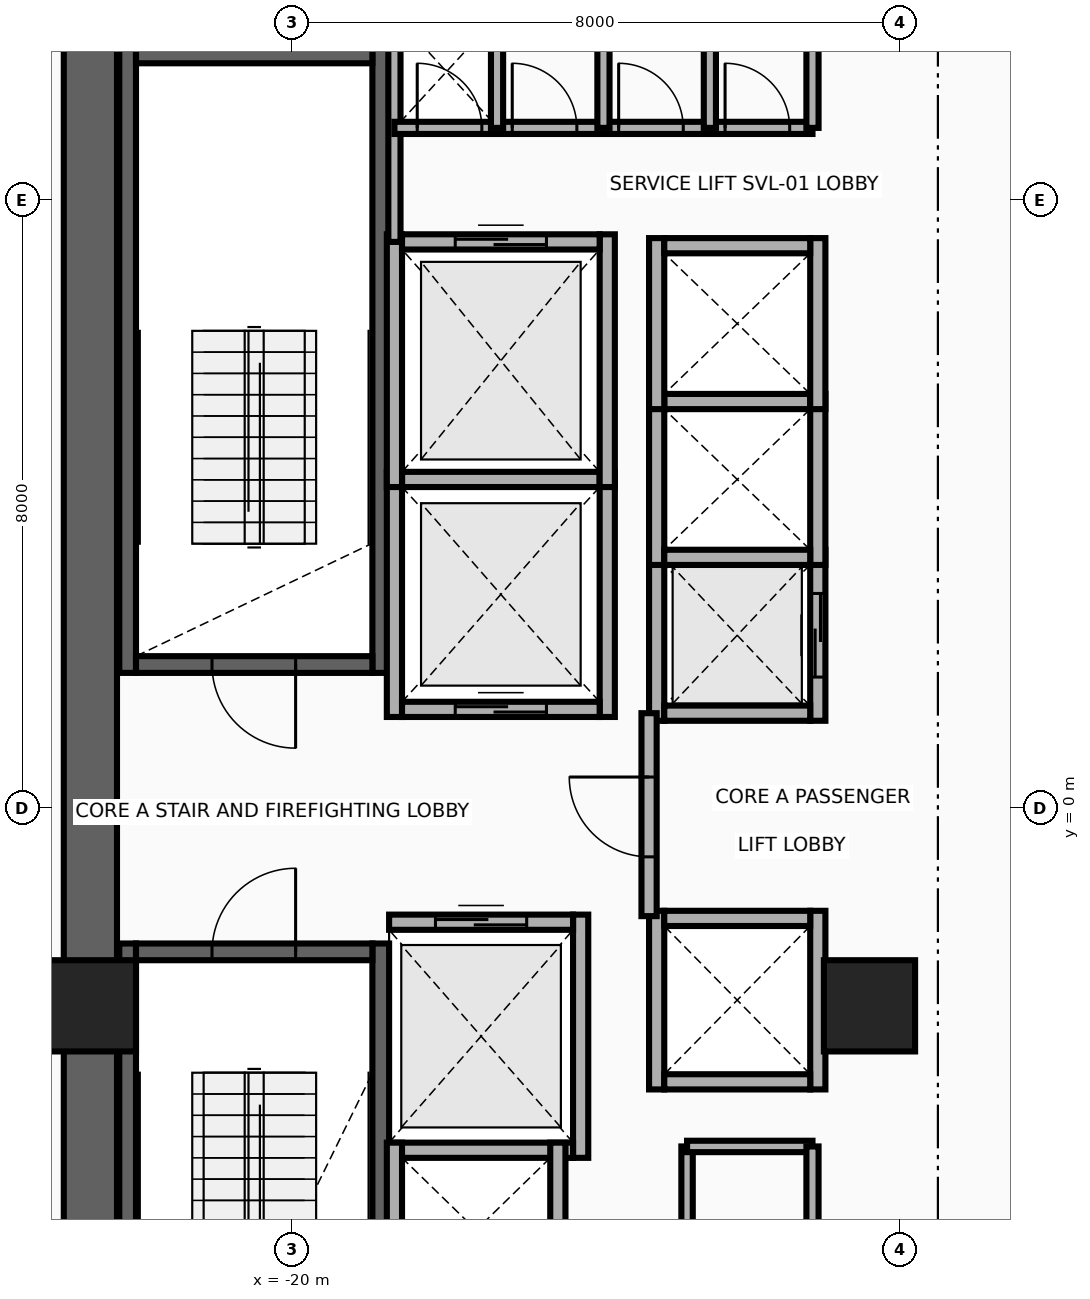
"""IFC4 building model, lengths in metres.
Left out: names, types, materials, properties, quantities, classifications, styles, units other than length and angle.
Written with IfcOpenShell. Run it as: python <this file> out.ifc"""

import sys

from ifc_helpers import new_model, si_unit, direction, frame, frame_2d, origin, origin_2d, place, context, subcontext, project, spatial, rectangle, extrude, source, transform, mapped, element, fill, save


model = new_model("IFC4")
c1 = context("Model", 3, precision=1e-05, world=origin(), true_north=direction((0.0, 1.0)))
c2 = subcontext(c1, "Body", "Model", "MODEL_VIEW")
j1 = project(units=[si_unit("LENGTHUNIT", "METRE"), si_unit("PLANEANGLEUNIT", "RADIAN")], contexts=[c1])
p1 = place(None, origin())
s1 = spatial("IfcSite", under=j1, at=p1, CompositionType="ELEMENT")
p2 = place(p1, origin())
s2 = spatial("IfcBuilding", under=s1, at=p2, CompositionType="ELEMENT")
p3 = place(p2, frame((0.0, 0.0, 109.4)))
s3 = spatial("IfcBuildingStorey", under=s2, at=p3, CompositionType="ELEMENT", Elevation=109.4)
for number, where, z_axis, x_axis in (
    (1, (-22.16, 1.78, 0.0), (0.0, 0.0, 1.0), (0.0, 1.0, 0.0)),
    (2, (-18.83, 1.78, 0.0), (0.0, 0.0, 1.0), (0.0, 1.0, 0.0)),
):
    element("IfcWall", number, at=place(p3, frame(where, z_axis=z_axis, x_axis=x_axis)), inside=s3, PredefinedType="SHEAR", context=c2, shape_type="SweptSolid", body=[
        extrude(rectangle(XDim=8.67, YDim=0.22, at=frame_2d((4.335, 0.0))), origin(), (0.0, 0.0, 1.0), 3.46),
    ])
p4 = place(p3, frame((-22.05, 1.89, 0.0), z_axis=(0.0, 0.0, 1.0), x_axis=(1.0, 0.0, 0.0)))
e3 = element("IfcWall", 3, at=p4, inside=s3, PredefinedType="SHEAR", context=c2, shape_type="SweptSolid", body=[
    extrude(rectangle(XDim=3.11, YDim=0.22, at=frame_2d((1.555, 0.0))), origin(), (0.0, 0.0, 1.0), 3.46),
])
p5 = place(p4, frame((1.0, 0.0, 0.0)))
e4 = element("IfcOpeningElement", 4, at=p5, cuts=e3, PredefinedType="OPENING", context=c2, shape_type="SweptSolid", body=[
    extrude(rectangle(XDim=1.1, YDim=2.15, at=frame_2d((0.55, 1.075))), frame((0.0, 0.125, 0.0), z_axis=(0.0, -1.0, 0.0), x_axis=(1.0, 0.0, 0.0)), (0.0, 0.0, 1.0), 0.25),
])
p6 = place(p3, frame((-22.05, 9.91, 0.0), z_axis=(0.0, 0.0, 1.0), x_axis=(1.0, 0.0, 0.0)))
e5 = element("IfcWall", 5, at=p6, inside=s3, PredefinedType="SHEAR", context=c2, shape_type="SweptSolid", body=[
    extrude(rectangle(XDim=3.11, YDim=0.22, at=frame_2d((1.555, 0.0))), origin(), (0.0, 0.0, 1.0), 3.46),
])
for number, where, z_axis, x_axis in (
    (6, (-22.16, -10.45, 0.0), (0.0, 0.0, 1.0), (0.0, 1.0, 0.0)),
    (7, (-18.83, -10.45, 0.0), (0.0, 0.0, 1.0), (0.0, 1.0, 0.0)),
):
    element("IfcWall", number, at=place(p3, frame(where, z_axis=z_axis, x_axis=x_axis)), inside=s3, PredefinedType="SHEAR", context=c2, shape_type="SweptSolid", body=[
        extrude(rectangle(XDim=8.67, YDim=0.22, at=frame_2d((4.335, 0.0))), origin(), (0.0, 0.0, 1.0), 3.46),
    ])
p7 = place(p3, frame((-22.05, -1.89, 0.0), z_axis=(0.0, 0.0, 1.0), x_axis=(1.0, 0.0, 0.0)))
e8 = element("IfcWall", 8, at=p7, inside=s3, PredefinedType="SHEAR", context=c2, shape_type="SweptSolid", body=[
    extrude(rectangle(XDim=3.11, YDim=0.22, at=frame_2d((1.555, 0.0))), origin(), (0.0, 0.0, 1.0), 3.46),
])
p8 = place(p7, frame((1.0, 0.0, 0.0)))
e9 = element("IfcOpeningElement", 9, at=p8, cuts=e8, PredefinedType="OPENING", context=c2, shape_type="SweptSolid", body=[
    extrude(rectangle(XDim=1.1, YDim=2.15, at=frame_2d((0.55, 1.075))), frame((0.0, 0.125, 0.0), z_axis=(0.0, -1.0, 0.0), x_axis=(1.0, 0.0, 0.0)), (0.0, 0.0, 1.0), 0.25),
])
p9 = place(p3, frame((-22.65, -11.15, 0.0), z_axis=(0.0, 0.0, 1.0), x_axis=(0.0, 1.0, 0.0)))
e10 = element("IfcWall", 10, at=p9, inside=s3, PredefinedType="SHEAR", context=c2, shape_type="SweptSolid", body=[
    extrude(rectangle(XDim=22.3, YDim=0.7, at=frame_2d((11.15, 0.0))), origin(), (0.0, 0.0, 1.0), 3.46),
])
m1 = source(origin(), c2, "Body", "SweptSolid", [
    extrude(rectangle(XDim=1.2, YDim=1.2, at=origin_2d()), origin(), (0.0, 0.0, 1.0), 3.7),
])
for number, where, z_axis, x_axis in (
    (11, (-22.65, -2.6, 0.0), (0.0, 0.0, 1.0), (1.0, 0.0, 0.0)),
    (12, (-12.4, -2.6, 0.0), (0.0, 0.0, 1.0), (1.0, 0.0, 0.0)),
):
    element("IfcColumn", number, at=place(p3, frame(where, z_axis=z_axis, x_axis=x_axis)), inside=s3, PredefinedType="COLUMN", context=c2, shape_type="MappedRepresentation", body=[
        mapped(m1, transform((0.0, 0.0, 0.0), x_axis=(1.0, 0.0, 0.0), y_axis=(0.0, 1.0, 0.0), z_axis=(0.0, 0.0, 1.0), scale=1.0)),
    ])
for number, where, z_axis, x_axis in (
    (13, (-18.65, 1.2, 0.0), (0.0, 0.0, 1.0), (0.0, 1.0, 0.0)),
    (14, (-15.85, 1.2, 0.0), (0.0, 0.0, 1.0), (0.0, 1.0, 0.0)),
):
    element("IfcWall", number, at=place(p3, frame(where, z_axis=z_axis, x_axis=x_axis)), inside=s3, PredefinedType="MOVABLE", context=c2, shape_type="SweptSolid", body=[
        extrude(rectangle(XDim=3.225, YDim=0.2, at=frame_2d((1.613, 0.0))), origin(), (0.0, 0.0, 1.0), 3.46),
    ])
p10 = place(p3, frame((-18.55, 1.3, 0.0), z_axis=(0.0, 0.0, 1.0), x_axis=(1.0, 0.0, 0.0)))
e15 = element("IfcWall", 15, at=p10, inside=s3, PredefinedType="MOVABLE", context=c2, shape_type="SweptSolid", body=[
    extrude(rectangle(XDim=2.6, YDim=0.2, at=frame_2d((1.3, 0.0))), origin(), (0.0, 0.0, 1.0), 3.46),
])
p11 = place(p10, frame((0.7, 0.0, 0.0)))
e16 = element("IfcOpeningElement", 16, at=p11, cuts=e15, PredefinedType="OPENING", context=c2, shape_type="SweptSolid", body=[
    extrude(rectangle(XDim=1.2, YDim=2.1, at=frame_2d((0.6, 1.05))), frame((0.0, 0.115, 0.0), z_axis=(0.0, -1.0, 0.0), x_axis=(1.0, 0.0, 0.0)), (0.0, 0.0, 1.0), 0.23),
])
p12 = place(p3, frame((-18.55, 4.325, 0.0), z_axis=(0.0, 0.0, 1.0), x_axis=(1.0, 0.0, 0.0)))
e17 = element("IfcWall", 17, at=p12, inside=s3, PredefinedType="MOVABLE", context=c2, shape_type="SweptSolid", body=[
    extrude(rectangle(XDim=2.6, YDim=0.2, at=frame_2d((1.3, 0.0))), origin(), (0.0, 0.0, 1.0), 3.46),
])
p13 = place(p3, frame((-16.2, -4.6, 0.0), z_axis=(0.0, 0.0, 1.0), x_axis=(0.0, 1.0, 0.0)))
e18 = element("IfcWall", 18, at=p13, inside=s3, PredefinedType="MOVABLE", context=c2, shape_type="SweptSolid", body=[
    extrude(rectangle(XDim=3.2, YDim=0.2, at=frame_2d((1.6, 0.0))), origin(), (0.0, 0.0, 1.0), 3.46),
])
p14 = place(p3, frame((-18.72, -4.5, 0.0), z_axis=(0.0, 0.0, 1.0), x_axis=(1.0, 0.0, 0.0)))
e19 = element("IfcWall", 19, at=p14, inside=s3, PredefinedType="MOVABLE", context=c2, shape_type="SweptSolid", body=[
    extrude(rectangle(XDim=2.42, YDim=0.2, at=frame_2d((1.21, 0.0))), origin(), (0.0, 0.0, 1.0), 3.46),
])
p15 = place(p3, frame((-18.72, -1.5, 0.0), z_axis=(0.0, 0.0, 1.0), x_axis=(1.0, 0.0, 0.0)))
e20 = element("IfcWall", 20, at=p15, inside=s3, PredefinedType="MOVABLE", context=c2, shape_type="SweptSolid", body=[
    extrude(rectangle(XDim=2.42, YDim=0.2, at=frame_2d((1.21, 0.0))), origin(), (0.0, 0.0, 1.0), 3.46),
])
p16 = place(p15, frame((0.61, 0.0, 0.0)))
e21 = element("IfcOpeningElement", 21, at=p16, cuts=e20, PredefinedType="OPENING", context=c2, shape_type="SweptSolid", body=[
    extrude(rectangle(XDim=1.2, YDim=2.1, at=frame_2d((0.6, 1.05))), frame((0.0, 0.115, 0.0), z_axis=(0.0, -1.0, 0.0), x_axis=(1.0, 0.0, 0.0)), (0.0, 0.0, 1.0), 0.23),
])
for number, where, z_axis, x_axis in (
    (22, (-18.65, 4.225, 0.0), (0.0, 0.0, 1.0), (0.0, 1.0, 0.0)),
    (23, (-15.85, 4.225, 0.0), (0.0, 0.0, 1.0), (0.0, 1.0, 0.0)),
):
    element("IfcWall", number, at=place(p3, frame(where, z_axis=z_axis, x_axis=x_axis)), inside=s3, PredefinedType="MOVABLE", context=c2, shape_type="SweptSolid", body=[
        extrude(rectangle(XDim=3.325, YDim=0.2, at=frame_2d((1.663, 0.0))), origin(), (0.0, 0.0, 1.0), 3.46),
    ])
p17 = place(p3, frame((-18.55, 7.45, 0.0), z_axis=(0.0, 0.0, 1.0), x_axis=(1.0, 0.0, 0.0)))
e24 = element("IfcWall", 24, at=p17, inside=s3, PredefinedType="MOVABLE", context=c2, shape_type="SweptSolid", body=[
    extrude(rectangle(XDim=2.6, YDim=0.2, at=frame_2d((1.3, 0.0))), origin(), (0.0, 0.0, 1.0), 3.46),
])
p18 = place(p17, frame((0.7, 0.0, 0.0)))
e25 = element("IfcOpeningElement", 25, at=p18, cuts=e24, PredefinedType="OPENING", context=c2, shape_type="SweptSolid", body=[
    extrude(rectangle(XDim=1.2, YDim=2.1, at=frame_2d((0.6, 1.05))), frame((0.0, 0.115, 0.0), z_axis=(0.0, -1.0, 0.0), x_axis=(1.0, 0.0, 0.0)), (0.0, 0.0, 1.0), 0.23),
])
p19 = place(p3, frame((-15.2, 1.15, 0.0), z_axis=(0.0, 0.0, 1.0), x_axis=(0.0, 1.0, 0.0)))
e26 = element("IfcWall", 26, at=p19, inside=s3, PredefinedType="MOVABLE", context=c2, shape_type="SweptSolid", body=[
    extrude(rectangle(XDim=2.25, YDim=0.2, at=frame_2d((1.125, 0.0))), origin(), (0.0, 0.0, 1.0), 3.46),
])
p20 = place(p3, frame((-13.08, 1.15, 0.0), z_axis=(0.0, 0.0, 1.0), x_axis=(0.0, 1.0, 0.0)))
e27 = element("IfcWall", 27, at=p20, inside=s3, PredefinedType="MOVABLE", context=c2, shape_type="SweptSolid", body=[
    extrude(rectangle(XDim=2.25, YDim=0.2, at=frame_2d((1.125, 0.0))), origin(), (0.0, 0.0, 1.0), 3.46),
])
p21 = place(p20, frame((0.575, 0.0, 0.0)))
e28 = element("IfcOpeningElement", 28, at=p21, cuts=e27, PredefinedType="OPENING", context=c2, shape_type="SweptSolid", body=[
    extrude(rectangle(XDim=1.1, YDim=2.1, at=frame_2d((0.55, 1.05))), frame((0.0, 0.115, 0.0), z_axis=(0.0, -1.0, 0.0), x_axis=(1.0, 0.0, 0.0)), (0.0, 0.0, 1.0), 0.23),
])
p22 = place(p3, frame((-15.1, 1.25, 0.0), z_axis=(0.0, 0.0, 1.0), x_axis=(1.0, 0.0, 0.0)))
e29 = element("IfcWall", 29, at=p22, inside=s3, PredefinedType="MOVABLE", context=c2, shape_type="SweptSolid", body=[
    extrude(rectangle(XDim=1.92, YDim=0.2, at=frame_2d((0.96, 0.0))), origin(), (0.0, 0.0, 1.0), 3.46),
])
for number, where, z_axis, x_axis in (
    (30, (-15.2, 3.2, 0.0), (0.0, 0.0, 1.0), (0.0, 1.0, 0.0)),
    (31, (-13.08, 3.2, 0.0), (0.0, 0.0, 1.0), (0.0, 1.0, 0.0)),
):
    element("IfcWall", number, at=place(p3, frame(where, z_axis=z_axis, x_axis=x_axis)), inside=s3, PredefinedType="MOVABLE", context=c2, shape_type="SweptSolid", body=[
        extrude(rectangle(XDim=2.25, YDim=0.2, at=frame_2d((1.125, 0.0))), origin(), (0.0, 0.0, 1.0), 3.46),
    ])
for number, where, z_axis, x_axis in (
    (32, (-15.1, 3.3, 0.0), (0.0, 0.0, 1.0), (1.0, 0.0, 0.0)),
    (33, (-15.1, 5.35, 0.0), (0.0, 0.0, 1.0), (1.0, 0.0, 0.0)),
):
    element("IfcWall", number, at=place(p3, frame(where, z_axis=z_axis, x_axis=x_axis)), inside=s3, PredefinedType="MOVABLE", context=c2, shape_type="SweptSolid", body=[
        extrude(rectangle(XDim=1.92, YDim=0.2, at=frame_2d((0.96, 0.0))), origin(), (0.0, 0.0, 1.0), 3.46),
    ])
for number, where, z_axis, x_axis in (
    (34, (-15.2, 5.25, 0.0), (0.0, 0.0, 1.0), (0.0, 1.0, 0.0)),
    (35, (-13.08, 5.25, 0.0), (0.0, 0.0, 1.0), (0.0, 1.0, 0.0)),
):
    element("IfcWall", number, at=place(p3, frame(where, z_axis=z_axis, x_axis=x_axis)), inside=s3, PredefinedType="MOVABLE", context=c2, shape_type="SweptSolid", body=[
        extrude(rectangle(XDim=2.25, YDim=0.2, at=frame_2d((1.125, 0.0))), origin(), (0.0, 0.0, 1.0), 3.46),
    ])
p23 = place(p3, frame((-15.1, 7.4, 0.0), z_axis=(0.0, 0.0, 1.0), x_axis=(1.0, 0.0, 0.0)))
e36 = element("IfcWall", 36, at=p23, inside=s3, PredefinedType="MOVABLE", context=c2, shape_type="SweptSolid", body=[
    extrude(rectangle(XDim=1.92, YDim=0.2, at=frame_2d((0.96, 0.0))), origin(), (0.0, 0.0, 1.0), 3.46),
])
for number, where, z_axis, x_axis in (
    (37, (-18.65, -6.7, 0.0), (0.0, 0.0, 1.0), (0.0, 1.0, 0.0)),
    (38, (-16.5, -6.7, 0.0), (0.0, 0.0, 1.0), (0.0, 1.0, 0.0)),
):
    element("IfcWall", number, at=place(p3, frame(where, z_axis=z_axis, x_axis=x_axis)), inside=s3, PredefinedType="MOVABLE", context=c2, shape_type="SweptSolid", body=[
        extrude(rectangle(XDim=2.3, YDim=0.2, at=frame_2d((1.15, 0.0))), origin(), (0.0, 0.0, 1.0), 3.46),
    ])
for number, where, z_axis, x_axis in (
    (39, (-15.2, -3.7, 0.0), (0.0, 0.0, 1.0), (0.0, 1.0, 0.0)),
    (40, (-13.08, -3.7, 0.0), (0.0, 0.0, 1.0), (0.0, 1.0, 0.0)),
):
    element("IfcWall", number, at=place(p3, frame(where, z_axis=z_axis, x_axis=x_axis)), inside=s3, PredefinedType="MOVABLE", context=c2, shape_type="SweptSolid", body=[
        extrude(rectangle(XDim=2.35, YDim=0.2, at=frame_2d((1.175, 0.0))), origin(), (0.0, 0.0, 1.0), 3.46),
    ])
for number, where, z_axis, x_axis in (
    (41, (-15.1, -3.6, 0.0), (0.0, 0.0, 1.0), (1.0, 0.0, 0.0)),
    (42, (-15.1, -1.45, 0.0), (0.0, 0.0, 1.0), (1.0, 0.0, 0.0)),
):
    element("IfcWall", number, at=place(p3, frame(where, z_axis=z_axis, x_axis=x_axis)), inside=s3, PredefinedType="MOVABLE", context=c2, shape_type="SweptSolid", body=[
        extrude(rectangle(XDim=1.92, YDim=0.2, at=frame_2d((0.96, 0.0))), origin(), (0.0, 0.0, 1.0), 3.46),
    ])
p24 = place(p3, frame((-15.3, -1.42, 0.0), z_axis=(0.0, 0.0, 1.0), x_axis=(0.0, 1.0, 0.0)))
e43 = element("IfcWall", 43, at=p24, inside=s3, PredefinedType="PARTITIONING", context=c2, shape_type="SweptSolid", body=[
    extrude(rectangle(XDim=2.67, YDim=0.2, at=frame_2d((1.335, 0.0))), origin(), (0.0, 0.0, 1.0), 3.46),
])
p25 = place(p24, frame((0.78, 0.0, 0.0)))
e44 = element("IfcOpeningElement", 44, at=p25, cuts=e43, PredefinedType="OPENING", context=c2, shape_type="SweptSolid", body=[
    extrude(rectangle(XDim=1.05, YDim=2.15, at=frame_2d((0.525, 1.075))), frame((0.0, 0.115, 0.0), z_axis=(0.0, -1.0, 0.0), x_axis=(1.0, 0.0, 0.0)), (0.0, 0.0, 1.0), 0.23),
])
p26 = place(p3, frame((-18.65, 7.45, 0.0), z_axis=(0.0, 0.0, 1.0), x_axis=(0.0, 1.0, 0.0)))
e45 = element("IfcWall", 45, at=p26, inside=s3, PredefinedType="PARTITIONING", context=c2, shape_type="SweptSolid", body=[
    extrude(rectangle(XDim=2.93, YDim=0.16, at=frame_2d((1.465, 0.0))), origin(), (0.0, 0.0, 1.0), 3.46),
])
p27 = place(p3, frame((-18.65, 8.95, 0.0), z_axis=(0.0, 0.0, 1.0), x_axis=(1.0, 0.0, 0.0)))
e46 = element("IfcWall", 46, at=p27, inside=s3, PredefinedType="PARTITIONING", context=c2, shape_type="SweptSolid", body=[
    extrude(rectangle(XDim=5.5, YDim=0.16, at=frame_2d((2.75, 0.0))), origin(), (0.0, 0.0, 1.0), 3.46),
])
p28 = place(p27, frame((0.3, 0.0, 0.0)))
e47 = element("IfcOpeningElement", 47, at=p28, cuts=e46, PredefinedType="OPENING", context=c2, shape_type="SweptSolid", body=[
    extrude(rectangle(XDim=0.85, YDim=2.05, at=frame_2d((0.425, 1.025))), frame((0.0, 0.095, 0.0), z_axis=(0.0, -1.0, 0.0), x_axis=(1.0, 0.0, 0.0)), (0.0, 0.0, 1.0), 0.19),
])
p29 = place(p27, frame((1.55, 0.0, 0.0)))
e48 = element("IfcOpeningElement", 48, at=p29, cuts=e46, PredefinedType="OPENING", context=c2, shape_type="SweptSolid", body=[
    extrude(rectangle(XDim=0.85, YDim=2.05, at=frame_2d((0.425, 1.025))), frame((0.0, 0.095, 0.0), z_axis=(0.0, -1.0, 0.0), x_axis=(1.0, 0.0, 0.0)), (0.0, 0.0, 1.0), 0.19),
])
p30 = place(p27, frame((2.95, 0.0, 0.0)))
e49 = element("IfcOpeningElement", 49, at=p30, cuts=e46, PredefinedType="OPENING", context=c2, shape_type="SweptSolid", body=[
    extrude(rectangle(XDim=0.85, YDim=2.05, at=frame_2d((0.425, 1.025))), frame((0.0, 0.095, 0.0), z_axis=(0.0, -1.0, 0.0), x_axis=(1.0, 0.0, 0.0)), (0.0, 0.0, 1.0), 0.19),
])
p31 = place(p27, frame((4.35, 0.0, 0.0)))
e50 = element("IfcOpeningElement", 50, at=p31, cuts=e46, PredefinedType="OPENING", context=c2, shape_type="SweptSolid", body=[
    extrude(rectangle(XDim=0.85, YDim=2.05, at=frame_2d((0.425, 1.025))), frame((0.0, 0.095, 0.0), z_axis=(0.0, -1.0, 0.0), x_axis=(1.0, 0.0, 0.0)), (0.0, 0.0, 1.0), 0.19),
])
for number, where, z_axis, x_axis in (
    (51, (-13.15, 8.95, 0.0), (0.0, 0.0, 1.0), (0.0, 1.0, 0.0)),
    (52, (-17.3, 8.95, 0.0), (0.0, 0.0, 1.0), (0.0, 1.0, 0.0)),
    (53, (-15.9, 8.95, 0.0), (0.0, 0.0, 1.0), (0.0, 1.0, 0.0)),
    (54, (-14.5, 8.95, 0.0), (0.0, 0.0, 1.0), (0.0, 1.0, 0.0)),
):
    element("IfcWall", number, at=place(p3, frame(where, z_axis=z_axis, x_axis=x_axis)), inside=s3, PredefinedType="PARTITIONING", context=c2, shape_type="SweptSolid", body=[
        extrude(rectangle(XDim=1.43, YDim=0.16, at=frame_2d((0.715, 0.0))), origin(), (0.0, 0.0, 1.0), 3.46),
    ])
p32 = place(p3, frame((-14.8, -6.58, 0.0), z_axis=(0.0, 0.0, 1.0), x_axis=(0.0, 1.0, 0.0)))
e55 = element("IfcWall", 55, at=p32, inside=s3, PredefinedType="PARTITIONING", context=c2, shape_type="SweptSolid", body=[
    extrude(rectangle(XDim=2.13, YDim=0.15, at=frame_2d((1.065, 0.0))), origin(), (0.0, 0.0, 1.0), 3.46),
])
p33 = place(p3, frame((-14.8, -4.45, 0.0), z_axis=(0.0, 0.0, 1.0), x_axis=(1.0, 0.0, 0.0)))
e56 = element("IfcWall", 56, at=p33, inside=s3, PredefinedType="PARTITIONING", context=c2, shape_type="SweptSolid", body=[
    extrude(rectangle(XDim=1.65, YDim=0.15, at=frame_2d((0.825, 0.0))), origin(), (0.0, 0.0, 1.0), 3.46),
])
p34 = place(p3, frame((-13.15, -6.58, 0.0), z_axis=(0.0, 0.0, 1.0), x_axis=(0.0, 1.0, 0.0)))
e57 = element("IfcWall", 57, at=p34, inside=s3, PredefinedType="PARTITIONING", context=c2, shape_type="SweptSolid", body=[
    extrude(rectangle(XDim=2.13, YDim=0.16, at=frame_2d((1.065, 0.0))), origin(), (0.0, 0.0, 1.0), 3.46),
])
p35 = place(p11, origin())
e58 = element("IfcDoor", 58, at=p35, inside=s3, OperationType="DOUBLE_DOOR_SLIDING", PredefinedType="DOOR", context=c2, shape_type="SweptSolid", body=[
    extrude(rectangle(XDim=1.2, YDim=2.1, at=frame_2d((0.6, 1.05))), frame((0.0, 0.025, 0.0), z_axis=(0.0, -1.0, 0.0), x_axis=(1.0, 0.0, 0.0)), (0.0, 0.0, 1.0), 0.05),
])
fill(e16, e58)
p36 = place(p16, origin())
e59 = element("IfcDoor", 59, at=p36, inside=s3, OperationType="DOUBLE_DOOR_SLIDING", PredefinedType="DOOR", context=c2, shape_type="SweptSolid", body=[
    extrude(rectangle(XDim=1.2, YDim=2.1, at=frame_2d((0.6, 1.05))), frame((0.0, 0.025, 0.0), z_axis=(0.0, -1.0, 0.0), x_axis=(1.0, 0.0, 0.0)), (0.0, 0.0, 1.0), 0.05),
])
fill(e21, e59)
p37 = place(p18, origin())
e60 = element("IfcDoor", 60, at=p37, inside=s3, OperationType="DOUBLE_DOOR_SLIDING", PredefinedType="DOOR", context=c2, shape_type="SweptSolid", body=[
    extrude(rectangle(XDim=1.2, YDim=2.1, at=frame_2d((0.6, 1.05))), frame((0.0, 0.025, 0.0), z_axis=(0.0, -1.0, 0.0), x_axis=(1.0, 0.0, 0.0)), (0.0, 0.0, 1.0), 0.05),
])
fill(e25, e60)
p38 = place(p21, origin())
e61 = element("IfcDoor", 61, at=p38, inside=s3, OperationType="DOUBLE_DOOR_SLIDING", PredefinedType="DOOR", context=c2, shape_type="SweptSolid", body=[
    extrude(rectangle(XDim=1.1, YDim=2.1, at=frame_2d((0.55, 1.05))), frame((0.0, 0.025, 0.0), z_axis=(0.0, -1.0, 0.0), x_axis=(1.0, 0.0, 0.0)), (0.0, 0.0, 1.0), 0.05),
])
fill(e28, e61)
p39 = place(p25, origin())
e62 = element("IfcDoor", 62, at=p39, inside=s3, OperationType="SINGLE_SWING_RIGHT", PredefinedType="DOOR", context=c2, shape_type="SweptSolid", body=[
    extrude(rectangle(XDim=1.05, YDim=2.15, at=frame_2d((0.525, 1.075))), frame((0.0, 0.025, 0.0), z_axis=(0.0, -1.0, 0.0), x_axis=(1.0, 0.0, 0.0)), (0.0, 0.0, 1.0), 0.05),
])
fill(e44, e62)
p40 = place(p5, frame((1.1, 0.0, 0.0), z_axis=(0.0, 0.0, 1.0), x_axis=(-1.0, 0.0, 0.0)))
e63 = element("IfcDoor", 63, at=p40, inside=s3, OperationType="SINGLE_SWING_LEFT", PredefinedType="DOOR", context=c2, shape_type="SweptSolid", body=[
    extrude(rectangle(XDim=1.1, YDim=2.15, at=frame_2d((0.55, 1.075))), frame((0.0, 0.025, 0.0), z_axis=(0.0, -1.0, 0.0), x_axis=(1.0, 0.0, 0.0)), (0.0, 0.0, 1.0), 0.05),
])
fill(e4, e63)
p41 = place(p8, origin())
e64 = element("IfcDoor", 64, at=p41, inside=s3, OperationType="SINGLE_SWING_RIGHT", PredefinedType="DOOR", context=c2, shape_type="SweptSolid", body=[
    extrude(rectangle(XDim=1.1, YDim=2.15, at=frame_2d((0.55, 1.075))), frame((0.0, 0.025, 0.0), z_axis=(0.0, -1.0, 0.0), x_axis=(1.0, 0.0, 0.0)), (0.0, 0.0, 1.0), 0.05),
])
fill(e9, e64)
p42 = place(p28, origin())
e65 = element("IfcDoor", 65, at=p42, inside=s3, OperationType="SINGLE_SWING_LEFT", PredefinedType="DOOR", context=c2, shape_type="SweptSolid", body=[
    extrude(rectangle(XDim=0.85, YDim=2.05, at=frame_2d((0.425, 1.025))), frame((0.0, 0.025, 0.0), z_axis=(0.0, -1.0, 0.0), x_axis=(1.0, 0.0, 0.0)), (0.0, 0.0, 1.0), 0.05),
])
fill(e47, e65)
p43 = place(p29, origin())
e66 = element("IfcDoor", 66, at=p43, inside=s3, OperationType="SINGLE_SWING_RIGHT", PredefinedType="DOOR", context=c2, shape_type="SweptSolid", body=[
    extrude(rectangle(XDim=0.85, YDim=2.05, at=frame_2d((0.425, 1.025))), frame((0.0, 0.025, 0.0), z_axis=(0.0, -1.0, 0.0), x_axis=(1.0, 0.0, 0.0)), (0.0, 0.0, 1.0), 0.05),
])
fill(e48, e66)
p44 = place(p30, origin())
e67 = element("IfcDoor", 67, at=p44, inside=s3, OperationType="SINGLE_SWING_LEFT", PredefinedType="DOOR", context=c2, shape_type="SweptSolid", body=[
    extrude(rectangle(XDim=0.85, YDim=2.05, at=frame_2d((0.425, 1.025))), frame((0.0, 0.025, 0.0), z_axis=(0.0, -1.0, 0.0), x_axis=(1.0, 0.0, 0.0)), (0.0, 0.0, 1.0), 0.05),
])
fill(e49, e67)
p45 = place(p31, origin())
e68 = element("IfcDoor", 68, at=p45, inside=s3, OperationType="SINGLE_SWING_RIGHT", PredefinedType="DOOR", context=c2, shape_type="SweptSolid", body=[
    extrude(rectangle(XDim=0.85, YDim=2.05, at=frame_2d((0.425, 1.025))), frame((0.0, 0.025, 0.0), z_axis=(0.0, -1.0, 0.0), x_axis=(1.0, 0.0, 0.0)), (0.0, 0.0, 1.0), 0.05),
])
fill(e50, e68)
save(model, sys.argv[1])
